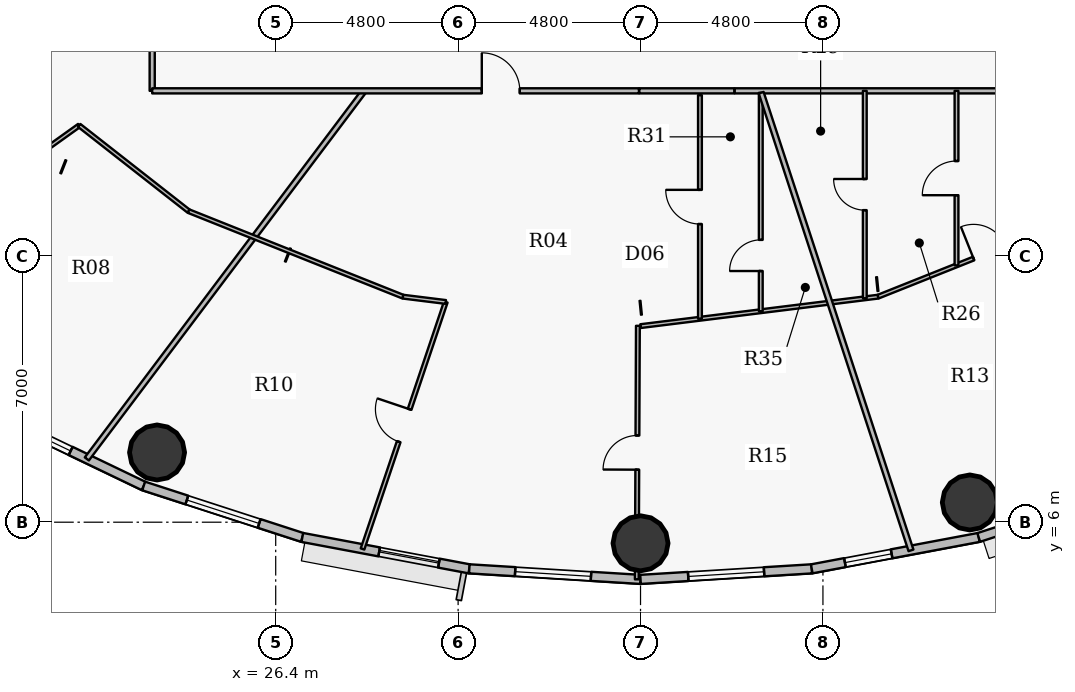
"""IFC4 building model, lengths in metres.
Left out: names, types, materials, properties, quantities, classifications, styles, units other than length and angle.
Written with IfcOpenShell. Run it as: python <this file> out.ifc"""

import sys

from ifc_helpers import new_model, si_unit, direction, frame, frame_2d, origin, origin_2d, place, context, subcontext, project, spatial, rectangle, hollow_circle, extrude, source, transform, mapped, element, fill, save


model = new_model("IFC4")
c1 = context("Model", 3, precision=1e-05, world=origin(), true_north=direction((0.0, 1.0)))
c2 = subcontext(c1, "Body", "Model", "MODEL_VIEW")
j1 = project(units=[si_unit("LENGTHUNIT", "METRE"), si_unit("PLANEANGLEUNIT", "RADIAN")], contexts=[c1])
p1 = place(None, origin())
s1 = spatial("IfcSite", under=j1, at=p1, CompositionType="ELEMENT")
p2 = place(p1, origin())
s2 = spatial("IfcBuilding", under=s1, at=p2, CompositionType="ELEMENT")
p3 = place(p2, frame((0.0, 0.0, 112.2)))
s3 = spatial("IfcBuildingStorey", under=s2, at=p3, CompositionType="ELEMENT", Elevation=112.2)
for number, where, z_axis, x_axis in (
    (1, (23.278, 7.835, 0.0), (0.0, 0.0, 1.0), (1.0, 0.0, 0.0)),
    (2, (36.0, 5.445, 0.0), (0.0, 0.0, 1.0), (1.0, 0.0, 0.0)),
    (3, (44.666, 6.519, 0.0), (0.0, 0.0, 1.0), (1.0, 0.0, 0.0)),
):
    element("IfcColumn", number, at=place(p3, frame(where, z_axis=z_axis, x_axis=x_axis)), inside=s3, PredefinedType="COLUMN", context=c2, shape_type="SweptSolid", body=[
        extrude(hollow_circle(Radius=0.725, WallThickness=0.042, at=origin_2d()), origin(), (0.0, 0.0, 1.0), 3.75),
    ])
p4 = place(p3, frame((22.926, 6.953, 0.0), z_axis=(0.0, 0.0, 1.0), x_axis=(-0.901589935876, 0.432591709962, 0.0)))
e4 = element("IfcWall", 4, at=p4, inside=s3, PredefinedType="SOLIDWALL", context=c2, shape_type="SweptSolid", body=[
    extrude(rectangle(XDim=4.272, YDim=0.24, at=frame_2d((2.136, 0.0))), origin(), (0.0, 0.0, 1.0), 3.5),
])
p5 = place(p4, frame((2.132, 0.0, 0.9)))
e5 = element("IfcOpeningElement", 5, at=p5, cuts=e4, PredefinedType="OPENING", context=c2, shape_type="SweptSolid", body=[
    extrude(rectangle(XDim=1.25, YDim=1.65, at=origin_2d()), frame((0.625, 0.13, 0.825), z_axis=(0.0, -1.0, 0.0), x_axis=(1.0, 0.0, 0.0)), (0.0, 0.0, 1.0), 0.26),
])
p6 = place(p3, frame((27.1, 5.599, 0.0), z_axis=(0.0, 0.0, 1.0), x_axis=(-0.951211346073, 0.308540070495, 0.0)))
e6 = element("IfcWall", 6, at=p6, inside=s3, PredefinedType="SOLIDWALL", context=c2, shape_type="SweptSolid", body=[
    extrude(rectangle(XDim=4.388, YDim=0.24, at=frame_2d((2.194, 0.0))), origin(), (0.0, 0.0, 1.0), 3.5),
])
p7 = place(p6, frame((1.194, 0.0, 0.9)))
e7 = element("IfcOpeningElement", 7, at=p7, cuts=e6, PredefinedType="OPENING", context=c2, shape_type="SweptSolid", body=[
    extrude(rectangle(XDim=2.0, YDim=1.75, at=origin_2d()), frame((1.0, 0.13, 0.875), z_axis=(0.0, -1.0, 0.0), x_axis=(1.0, 0.0, 0.0)), (0.0, 0.0, 1.0), 0.26),
])
p8 = place(p3, frame((31.494, 4.773, 0.0), z_axis=(0.0, 0.0, 1.0), x_axis=(-0.982789252177, 0.184730305596, 0.0)))
e8 = element("IfcWall", 8, at=p8, inside=s3, PredefinedType="SOLIDWALL", context=c2, shape_type="SweptSolid", body=[
    extrude(rectangle(XDim=4.471, YDim=0.24, at=frame_2d((2.235, 0.0))), origin(), (0.0, 0.0, 1.0), 3.5),
])
p9 = place(p8, frame((0.814, 0.0, 0.9)))
e9 = element("IfcOpeningElement", 9, at=p9, cuts=e8, PredefinedType="OPENING", context=c2, shape_type="SweptSolid", body=[
    extrude(rectangle(XDim=1.6, YDim=1.75, at=origin_2d()), frame((0.8, 0.13, 0.875), z_axis=(0.0, -1.0, 0.0), x_axis=(1.0, 0.0, 0.0)), (0.0, 0.0, 1.0), 0.26),
])
p10 = place(p3, frame((36.0, 4.495, 0.0), z_axis=(0.0, 0.0, 1.0), x_axis=(-0.998107531589, 0.061492726276, 0.0)))
e10 = element("IfcWall", 10, at=p10, inside=s3, PredefinedType="SOLIDWALL", context=c2, shape_type="SweptSolid", body=[
    extrude(rectangle(XDim=4.514, YDim=0.24, at=frame_2d((2.257, 0.0))), origin(), (0.0, 0.0, 1.0), 3.5),
])
p11 = place(p10, frame((1.306, 0.0, 0.9)))
e11 = element("IfcOpeningElement", 11, at=p11, cuts=e10, PredefinedType="OPENING", context=c2, shape_type="SweptSolid", body=[
    extrude(rectangle(XDim=2.0, YDim=1.75, at=origin_2d()), frame((1.0, 0.13, 0.875), z_axis=(0.0, -1.0, 0.0), x_axis=(1.0, 0.0, 0.0)), (0.0, 0.0, 1.0), 0.26),
])
p12 = place(p3, frame((40.506, 4.773, 0.0), z_axis=(0.0, 0.0, 1.0), x_axis=(-0.998107531589, -0.061492726276, 0.0)))
e12 = element("IfcWall", 12, at=p12, inside=s3, PredefinedType="SOLIDWALL", context=c2, shape_type="SweptSolid", body=[
    extrude(rectangle(XDim=4.514, YDim=0.24, at=frame_2d((2.257, 0.0))), origin(), (0.0, 0.0, 1.0), 3.5),
])
p13 = place(p12, frame((1.257, 0.0, 0.9)))
e13 = element("IfcOpeningElement", 13, at=p13, cuts=e12, PredefinedType="OPENING", context=c2, shape_type="SweptSolid", body=[
    extrude(rectangle(XDim=2.0, YDim=1.75, at=origin_2d()), frame((1.0, 0.13, 0.875), z_axis=(0.0, -1.0, 0.0), x_axis=(1.0, 0.0, 0.0)), (0.0, 0.0, 1.0), 0.26),
])
p14 = place(p3, frame((44.9, 5.599, 0.0), z_axis=(0.0, 0.0, 1.0), x_axis=(-0.982789252177, -0.184730305596, 0.0)))
e14 = element("IfcWall", 14, at=p14, inside=s3, PredefinedType="SOLIDWALL", context=c2, shape_type="SweptSolid", body=[
    extrude(rectangle(XDim=4.471, YDim=0.24, at=frame_2d((2.235, 0.0))), origin(), (0.0, 0.0, 1.0), 3.5),
])
p15 = place(p14, frame((2.333, 0.0, 0.9)))
e15 = element("IfcOpeningElement", 15, at=p15, cuts=e14, PredefinedType="OPENING", context=c2, shape_type="SweptSolid", body=[
    extrude(rectangle(XDim=1.25, YDim=1.65, at=origin_2d()), frame((0.625, 0.13, 0.825), z_axis=(0.0, -1.0, 0.0), x_axis=(1.0, 0.0, 0.0)), (0.0, 0.0, 1.0), 0.26),
])
p16 = place(p3, frame((49.074, 6.953, 0.0), z_axis=(0.0, 0.0, 1.0), x_axis=(-0.951211346073, -0.308540070495, 0.0)))
e16 = element("IfcWall", 16, at=p16, inside=s3, PredefinedType="SOLIDWALL", context=c2, shape_type="SweptSolid", body=[
    extrude(rectangle(XDim=4.388, YDim=0.24, at=frame_2d((2.194, 0.0))), origin(), (0.0, 0.0, 1.0), 3.5),
])
p17 = place(p16, frame((1.194, 0.0, 0.9)))
e17 = element("IfcOpeningElement", 17, at=p17, cuts=e16, PredefinedType="OPENING", context=c2, shape_type="SweptSolid", body=[
    extrude(rectangle(XDim=2.0, YDim=1.75, at=origin_2d()), frame((1.0, 0.13, 0.875), z_axis=(0.0, -1.0, 0.0), x_axis=(1.0, 0.0, 0.0)), (0.0, 0.0, 1.0), 0.26),
])
p18 = place(p3, frame((14.811, 11.851, 0.0), z_axis=(0.0, 0.0, 1.0), x_axis=(0.813476205606, 0.581598197137, 0.0)))
e18 = element("IfcWall", 18, at=p18, inside=s3, PredefinedType="PARTITIONING", context=c2, shape_type="SweptSolid", body=[
    extrude(rectangle(XDim=7.889, YDim=0.1, at=frame_2d((3.945, 0.0))), origin(), (0.0, 0.0, 1.0), 2.935),
])
p19 = place(p18, frame((3.495, 0.0, 0.0)))
e19 = element("IfcOpeningElement", 19, at=p19, cuts=e18, PredefinedType="OPENING", context=c2, shape_type="SweptSolid", body=[
    extrude(rectangle(XDim=0.9, YDim=2.1, at=origin_2d()), frame((0.45, 0.06, 1.05), z_axis=(0.0, -1.0, 0.0), x_axis=(1.0, 0.0, 0.0)), (0.0, 0.0, 1.0), 0.12),
])
p20 = place(p3, frame((21.229, 16.44, 0.0), z_axis=(0.0, 0.0, 1.0), x_axis=(0.787324700524, -0.616538576201, 0.0)))
e20 = element("IfcWall", 20, at=p20, inside=s3, PredefinedType="PARTITIONING", context=c2, shape_type="SweptSolid", body=[
    extrude(rectangle(XDim=3.658, YDim=0.1, at=frame_2d((1.829, 0.0))), origin(), (0.0, 0.0, 1.0), 2.935),
])
p21 = place(p3, frame((21.43, 7.665, 0.0), z_axis=(0.0, 0.0, 1.0), x_axis=(0.601821582461, 0.798630567211, 0.0)))
e21 = element("IfcWall", 21, at=p21, inside=s3, PredefinedType="PARTITIONING", context=c2, shape_type="SweptSolid", body=[
    extrude(rectangle(XDim=12.127, YDim=0.135, at=frame_2d((6.063, 0.0))), origin(), (0.0, 0.0, 1.0), 2.935),
])
p22 = place(p3, frame((23.15, 17.35, 0.0), z_axis=(0.0, 0.0, 1.0), x_axis=(0.0, 1.0, 0.0)))
e22 = element("IfcWall", 22, at=p22, inside=s3, PredefinedType="PARTITIONING", context=c2, shape_type="SweptSolid", body=[
    extrude(rectangle(XDim=19.3, YDim=0.135, at=frame_2d((9.65, 0.0))), origin(), (0.0, 0.0, 1.0), 2.935),
])
p23 = place(p22, frame((15.889, 0.0, 0.0)))
e23 = element("IfcOpeningElement", 23, at=p23, cuts=e22, PredefinedType="OPENING", context=c2, shape_type="SweptSolid", body=[
    extrude(rectangle(XDim=1.0, YDim=2.15, at=origin_2d()), frame((0.5, 0.078, 1.075), z_axis=(0.0, -1.0, 0.0), x_axis=(1.0, 0.0, 0.0)), (0.0, 0.0, 1.0), 0.155),
])
p24 = place(p22, frame((6.279, 0.0, 0.0)))
e24 = element("IfcOpeningElement", 24, at=p24, cuts=e22, PredefinedType="OPENING", context=c2, shape_type="SweptSolid", body=[
    extrude(rectangle(XDim=1.0, YDim=2.15, at=origin_2d()), frame((0.5, 0.078, 1.075), z_axis=(0.0, -1.0, 0.0), x_axis=(1.0, 0.0, 0.0)), (0.0, 0.0, 1.0), 0.155),
])
p25 = place(p3, frame((23.15, 17.35, 0.0), z_axis=(0.0, 0.0, 1.0), x_axis=(1.0, 0.0, 0.0)))
e25 = element("IfcWall", 25, at=p25, inside=s3, PredefinedType="PARTITIONING", context=c2, shape_type="SweptSolid", body=[
    extrude(rectangle(XDim=12.808, YDim=0.135, at=frame_2d((6.404, 0.0))), origin(), (0.0, 0.0, 1.0), 2.935),
])
p26 = place(p25, frame((8.673, 0.0, 0.0)))
e26 = element("IfcOpeningElement", 26, at=p26, cuts=e25, PredefinedType="OPENING", context=c2, shape_type="SweptSolid", body=[
    extrude(rectangle(XDim=1.0, YDim=2.15, at=origin_2d()), frame((0.5, 0.078, 1.075), z_axis=(0.0, -1.0, 0.0), x_axis=(1.0, 0.0, 0.0)), (0.0, 0.0, 1.0), 0.155),
])
p27 = place(p3, frame((24.109, 14.184, 0.0), z_axis=(0.0, 0.0, 1.0), x_axis=(0.928803554156, -0.370572473055, 0.0)))
e27 = element("IfcWall", 27, at=p27, inside=s3, PredefinedType="PARTITIONING", context=c2, shape_type="SweptSolid", body=[
    extrude(rectangle(XDim=6.072, YDim=0.1, at=frame_2d((3.036, 0.0))), origin(), (0.0, 0.0, 1.0), 2.935),
])
p28 = place(p3, frame((28.685, 5.296, 0.0), z_axis=(0.0, 0.0, 1.0), x_axis=(0.319387131438, 0.947624324441, 0.0)))
e28 = element("IfcWall", 28, at=p28, inside=s3, PredefinedType="PARTITIONING", context=c2, shape_type="SweptSolid", body=[
    extrude(rectangle(XDim=6.858, YDim=0.1, at=frame_2d((3.429, 0.0))), origin(), (0.0, 0.0, 1.0), 2.935),
])
p29 = place(p28, frame((2.979, 0.0, 0.0)))
e29 = element("IfcOpeningElement", 29, at=p29, cuts=e28, PredefinedType="OPENING", context=c2, shape_type="SweptSolid", body=[
    extrude(rectangle(XDim=0.9, YDim=2.1, at=origin_2d()), frame((0.45, 0.06, 1.05), z_axis=(0.0, -1.0, 0.0), x_axis=(1.0, 0.0, 0.0)), (0.0, 0.0, 1.0), 0.12),
])
p30 = place(p3, frame((29.749, 11.934, 0.0), z_axis=(0.0, 0.0, 1.0), x_axis=(0.99240961586, -0.122976234894, 0.0)))
e30 = element("IfcWall", 30, at=p30, inside=s3, PredefinedType="PARTITIONING", context=c2, shape_type="SweptSolid", body=[
    extrude(rectangle(XDim=1.135, YDim=0.1, at=frame_2d((0.568, 0.0))), origin(), (0.0, 0.0, 1.0), 3.5),
])
p31 = place(p3, frame((35.902, 4.496, 0.0), z_axis=(0.0, 0.0, 1.0), x_axis=(0.004354785612, 0.999990517876, 0.0)))
e31 = element("IfcWall", 31, at=p31, inside=s3, PredefinedType="PARTITIONING", context=c2, shape_type="SweptSolid", body=[
    extrude(rectangle(XDim=6.671, YDim=0.1, at=frame_2d((3.336, 0.0))), origin(), (0.0, 0.0, 1.0), 2.935),
])
p32 = place(p31, frame((2.886, 0.0, 0.0)))
e32 = element("IfcOpeningElement", 32, at=p32, cuts=e31, PredefinedType="OPENING", context=c2, shape_type="SweptSolid", body=[
    extrude(rectangle(XDim=0.9, YDim=2.1, at=origin_2d()), frame((0.45, 0.06, 1.05), z_axis=(0.0, -1.0, 0.0), x_axis=(1.0, 0.0, 0.0)), (0.0, 0.0, 1.0), 0.12),
])
p33 = place(p3, frame((36.0, 11.159, 0.0), z_axis=(0.0, 0.0, 1.0), x_axis=(0.992395485088, 0.123090215599, 0.0)))
e33 = element("IfcWall", 33, at=p33, inside=s3, PredefinedType="PARTITIONING", context=c2, shape_type="SweptSolid", body=[
    extrude(rectangle(XDim=6.299, YDim=0.1, at=frame_2d((3.15, 0.0))), origin(), (0.0, 0.0, 1.0), 2.935),
])
p34 = place(p3, frame((37.564, 11.353, 0.0), z_axis=(0.0, 0.0, 1.0), x_axis=(0.0, 1.0, 0.0)))
e34 = element("IfcWall", 34, at=p34, inside=s3, PredefinedType="PARTITIONING", context=c2, shape_type="SweptSolid", body=[
    extrude(rectangle(XDim=5.884, YDim=0.1, at=frame_2d((2.942, 0.0))), origin(), (0.0, 0.0, 1.0), 2.985),
])
p35 = place(p34, frame((2.492, 0.0, 0.0)))
e35 = element("IfcOpeningElement", 35, at=p35, cuts=e34, PredefinedType="OPENING", context=c2, shape_type="SweptSolid", body=[
    extrude(rectangle(XDim=0.9, YDim=2.1, at=origin_2d()), frame((0.45, 0.06, 1.05), z_axis=(0.0, -1.0, 0.0), x_axis=(1.0, 0.0, 0.0)), (0.0, 0.0, 1.0), 0.12),
])
p36 = place(p3, frame((38.477, 17.35, 0.0), z_axis=(0.0, 0.0, 1.0), x_axis=(1.0, 0.0, 0.0)))
e36 = element("IfcWall", 36, at=p36, inside=s3, PredefinedType="PARTITIONING", context=c2, shape_type="SweptSolid", body=[
    extrude(rectangle(XDim=10.373, YDim=0.135, at=frame_2d((5.187, 0.0))), origin(), (0.0, 0.0, 1.0), 2.935),
])
p37 = place(p3, frame((39.164, 11.552, 0.0), z_axis=(0.0, 0.0, 1.0), x_axis=(0.0, 1.0, 0.0)))
e37 = element("IfcWall", 37, at=p37, inside=s3, PredefinedType="PARTITIONING", context=c2, shape_type="SweptSolid", body=[
    extrude(rectangle(XDim=5.748, YDim=0.1, at=frame_2d((2.874, 0.0))), origin(), (0.0, 0.0, 1.0), 2.985),
])
p38 = place(p37, frame((1.058, 0.0, 0.0)))
e38 = element("IfcOpeningElement", 38, at=p38, cuts=e37, PredefinedType="OPENING", context=c2, shape_type="SweptSolid", body=[
    extrude(rectangle(XDim=0.82, YDim=2.1, at=origin_2d()), frame((0.41, 0.06, 1.05), z_axis=(0.0, -1.0, 0.0), x_axis=(1.0, 0.0, 0.0)), (0.0, 0.0, 1.0), 0.12),
])
p39 = place(p3, frame((39.175, 17.301, 0.0), z_axis=(0.0, 0.0, 1.0), x_axis=(0.311090320612, -0.95038035145, 0.0)))
e39 = element("IfcWall", 39, at=p39, inside=s3, PredefinedType="PARTITIONING", context=c2, shape_type="SweptSolid", body=[
    extrude(rectangle(XDim=12.671, YDim=0.135, at=frame_2d((6.335, 0.0))), origin(), (0.0, 0.0, 1.0), 2.935),
])
p40 = place(p3, frame((41.901, 11.891, 0.0), z_axis=(0.0, 0.0, 1.0), x_axis=(0.0, 1.0, 0.0)))
e40 = element("IfcWall", 40, at=p40, inside=s3, PredefinedType="PARTITIONING", context=c2, shape_type="SweptSolid", body=[
    extrude(rectangle(XDim=5.459, YDim=0.1, at=frame_2d((2.729, 0.0))), origin(), (0.0, 0.0, 1.0), 2.935),
])
p41 = place(p40, frame((2.32, 0.0, 0.0)))
e41 = element("IfcOpeningElement", 41, at=p41, cuts=e40, PredefinedType="OPENING", context=c2, shape_type="SweptSolid", body=[
    extrude(rectangle(XDim=0.82, YDim=2.1, at=origin_2d()), frame((0.41, 0.06, 1.05), z_axis=(0.0, -1.0, 0.0), x_axis=(1.0, 0.0, 0.0)), (0.0, 0.0, 1.0), 0.12),
])
p42 = place(p3, frame((42.251, 11.934, 0.0), z_axis=(0.0, 0.0, 1.0), x_axis=(0.928803554156, 0.370572473055, 0.0)))
e42 = element("IfcWall", 42, at=p42, inside=s3, PredefinedType="PARTITIONING", context=c2, shape_type="SweptSolid", body=[
    extrude(rectangle(XDim=6.072, YDim=0.1, at=frame_2d((3.036, 0.0))), origin(), (0.0, 0.0, 1.0), 2.935),
])
p43 = place(p42, frame((2.705, 0.0, 0.0)))
e43 = element("IfcOpeningElement", 43, at=p43, cuts=e42, PredefinedType="OPENING", context=c2, shape_type="SweptSolid", body=[
    extrude(rectangle(XDim=0.9, YDim=2.1, at=origin_2d()), frame((0.45, 0.06, 1.05), z_axis=(0.0, -1.0, 0.0), x_axis=(1.0, 0.0, 0.0)), (0.0, 0.0, 1.0), 0.12),
])
p44 = place(p3, frame((44.315, 12.758, 0.0), z_axis=(0.0, 0.0, 1.0), x_axis=(0.0, 1.0, 0.0)))
e44 = element("IfcWall", 44, at=p44, inside=s3, PredefinedType="PARTITIONING", context=c2, shape_type="SweptSolid", body=[
    extrude(rectangle(XDim=4.593, YDim=0.1, at=frame_2d((2.296, 0.0))), origin(), (0.0, 0.0, 1.0), 3.5),
])
p45 = place(p44, frame((1.846, 0.0, 0.0)))
e45 = element("IfcOpeningElement", 45, at=p45, cuts=e44, PredefinedType="OPENING", context=c2, shape_type="SweptSolid", body=[
    extrude(rectangle(XDim=0.9, YDim=2.1, at=origin_2d()), frame((0.45, 0.06, 1.05), z_axis=(0.0, -1.0, 0.0), x_axis=(1.0, 0.0, 0.0)), (0.0, 0.0, 1.0), 0.12),
])
p46 = place(p3, frame((38.467, 17.35, 0.0), z_axis=(0.0, 0.0, 1.0), x_axis=(-1.0, 0.0, 0.0)))
e46 = element("IfcWall", 46, at=p46, inside=s3, PredefinedType="PARTITIONING", context=c2, shape_type="SweptSolid", body=[
    extrude(rectangle(XDim=2.499, YDim=0.135, at=frame_2d((1.25, 0.0))), origin(), (0.0, 0.0, 1.0), 2.935),
])
m1 = source(origin(), c2, "Body", "SweptSolid", [
    extrude(rectangle(XDim=1.25, YDim=1.65, at=origin_2d()), frame((0.625, 0.03, 0.825), z_axis=(0.0, -1.0, 0.0), x_axis=(1.0, 0.0, 0.0)), (0.0, 0.0, 1.0), 0.06),
])
p47 = place(p5, origin())
e47 = element("IfcWindow", 47, at=p47, inside=s3, PartitioningType="SINGLE_PANEL", PredefinedType="WINDOW", context=c2, shape_type="MappedRepresentation", body=[
    mapped(m1, transform((0.0, 0.0, 0.0), x_axis=(1.0, 0.0, 0.0), y_axis=(0.0, 1.0, 0.0), z_axis=(0.0, 0.0, 1.0), scale=1.0)),
])
fill(e5, e47)
m2 = source(origin(), c2, "Body", "SweptSolid", [
    extrude(rectangle(XDim=2.0, YDim=1.75, at=origin_2d()), frame((1.0, 0.03, 0.875), z_axis=(0.0, -1.0, 0.0), x_axis=(1.0, 0.0, 0.0)), (0.0, 0.0, 1.0), 0.06),
])
p48 = place(p7, origin())
e48 = element("IfcWindow", 48, at=p48, inside=s3, PartitioningType="DOUBLE_PANEL_VERTICAL", PredefinedType="WINDOW", context=c2, shape_type="MappedRepresentation", body=[
    mapped(m2, transform((0.0, 0.0, 0.0), x_axis=(1.0, 0.0, 0.0), y_axis=(0.0, 1.0, 0.0), z_axis=(0.0, 0.0, 1.0), scale=1.0)),
])
fill(e7, e48)
m3 = source(origin(), c2, "Body", "SweptSolid", [
    extrude(rectangle(XDim=1.6, YDim=1.75, at=origin_2d()), frame((0.8, 0.03, 0.875), z_axis=(0.0, -1.0, 0.0), x_axis=(1.0, 0.0, 0.0)), (0.0, 0.0, 1.0), 0.06),
])
p49 = place(p9, origin())
e49 = element("IfcWindow", 49, at=p49, inside=s3, PartitioningType="DOUBLE_PANEL_VERTICAL", PredefinedType="WINDOW", context=c2, shape_type="MappedRepresentation", body=[
    mapped(m3, transform((0.0, 0.0, 0.0), x_axis=(1.0, 0.0, 0.0), y_axis=(0.0, 1.0, 0.0), z_axis=(0.0, 0.0, 1.0), scale=1.0)),
])
fill(e9, e49)
p50 = place(p11, origin())
e50 = element("IfcWindow", 50, at=p50, inside=s3, PartitioningType="DOUBLE_PANEL_VERTICAL", PredefinedType="WINDOW", context=c2, shape_type="MappedRepresentation", body=[
    mapped(m2, transform((0.0, 0.0, 0.0), x_axis=(1.0, 0.0, 0.0), y_axis=(0.0, 1.0, 0.0), z_axis=(0.0, 0.0, 1.0), scale=1.0)),
])
fill(e11, e50)
p51 = place(p13, origin())
e51 = element("IfcWindow", 51, at=p51, inside=s3, PartitioningType="DOUBLE_PANEL_VERTICAL", PredefinedType="WINDOW", context=c2, shape_type="MappedRepresentation", body=[
    mapped(m2, transform((0.0, 0.0, 0.0), x_axis=(1.0, 0.0, 0.0), y_axis=(0.0, 1.0, 0.0), z_axis=(0.0, 0.0, 1.0), scale=1.0)),
])
fill(e13, e51)
p52 = place(p15, origin())
e52 = element("IfcWindow", 52, at=p52, inside=s3, PartitioningType="SINGLE_PANEL", PredefinedType="WINDOW", context=c2, shape_type="MappedRepresentation", body=[
    mapped(m1, transform((0.0, 0.0, 0.0), x_axis=(1.0, 0.0, 0.0), y_axis=(0.0, 1.0, 0.0), z_axis=(0.0, 0.0, 1.0), scale=1.0)),
])
fill(e15, e52)
m4 = source(origin(), c2, "Body", "SweptSolid", [
    extrude(rectangle(XDim=1.0, YDim=2.15, at=origin_2d()), frame((0.5, 0.025, 1.075), z_axis=(0.0, -1.0, 0.0), x_axis=(1.0, 0.0, 0.0)), (0.0, 0.0, 1.0), 0.05),
])
p53 = place(p26, origin())
e53 = element("IfcDoor", 53, at=p53, inside=s3, OperationType="SINGLE_SWING_LEFT", PredefinedType="DOOR", context=c2, shape_type="MappedRepresentation", body=[
    mapped(m4, transform((0.0, 0.0, 0.0), x_axis=(1.0, 0.0, 0.0), y_axis=(0.0, 1.0, 0.0), z_axis=(0.0, 0.0, 1.0), scale=1.0)),
])
fill(e26, e53)
m5 = source(origin(), c2, "Body", "SweptSolid", [
    extrude(rectangle(XDim=0.9, YDim=2.1, at=origin_2d()), frame((0.45, 0.025, 1.05), z_axis=(0.0, -1.0, 0.0), x_axis=(1.0, 0.0, 0.0)), (0.0, 0.0, 1.0), 0.05),
])
p54 = place(p29, origin())
e54 = element("IfcDoor", 54, at=p54, inside=s3, OperationType="SINGLE_SWING_RIGHT", PredefinedType="DOOR", context=c2, shape_type="MappedRepresentation", body=[
    mapped(m5, transform((0.0, 0.0, 0.0), x_axis=(1.0, 0.0, 0.0), y_axis=(0.0, 1.0, 0.0), z_axis=(0.0, 0.0, 1.0), scale=1.0)),
])
fill(e29, e54)
p55 = place(p32, origin())
e55 = element("IfcDoor", 55, at=p55, inside=s3, OperationType="SINGLE_SWING_LEFT", PredefinedType="DOOR", context=c2, shape_type="MappedRepresentation", body=[
    mapped(m5, transform((0.0, 0.0, 0.0), x_axis=(1.0, 0.0, 0.0), y_axis=(0.0, 1.0, 0.0), z_axis=(0.0, 0.0, 1.0), scale=1.0)),
])
fill(e32, e55)
p56 = place(p35, origin())
e56 = element("IfcDoor", 56, at=p56, inside=s3, OperationType="SINGLE_SWING_RIGHT", PredefinedType="DOOR", context=c2, shape_type="MappedRepresentation", body=[
    mapped(m5, transform((0.0, 0.0, 0.0), x_axis=(1.0, 0.0, 0.0), y_axis=(0.0, 1.0, 0.0), z_axis=(0.0, 0.0, 1.0), scale=1.0)),
])
fill(e35, e56)
m6 = source(origin(), c2, "Body", "SweptSolid", [
    extrude(rectangle(XDim=0.82, YDim=2.1, at=origin_2d()), frame((0.41, 0.025, 1.05), z_axis=(0.0, -1.0, 0.0), x_axis=(1.0, 0.0, 0.0)), (0.0, 0.0, 1.0), 0.05),
])
p57 = place(p38, origin())
e57 = element("IfcDoor", 57, at=p57, inside=s3, OperationType="SINGLE_SWING_LEFT", PredefinedType="DOOR", context=c2, shape_type="MappedRepresentation", body=[
    mapped(m6, transform((0.0, 0.0, 0.0), x_axis=(1.0, 0.0, 0.0), y_axis=(0.0, 1.0, 0.0), z_axis=(0.0, 0.0, 1.0), scale=1.0)),
])
fill(e38, e57)
p58 = place(p43, origin())
e58 = element("IfcDoor", 58, at=p58, inside=s3, OperationType="SINGLE_SWING_LEFT", PredefinedType="DOOR", context=c2, shape_type="MappedRepresentation", body=[
    mapped(m5, transform((0.0, 0.0, 0.0), x_axis=(1.0, 0.0, 0.0), y_axis=(0.0, 1.0, 0.0), z_axis=(0.0, 0.0, 1.0), scale=1.0)),
])
fill(e43, e58)
p59 = place(p45, origin())
e59 = element("IfcDoor", 59, at=p59, inside=s3, OperationType="SINGLE_SWING_LEFT", PredefinedType="DOOR", context=c2, shape_type="MappedRepresentation", body=[
    mapped(m5, transform((0.0, 0.0, 0.0), x_axis=(1.0, 0.0, 0.0), y_axis=(0.0, 1.0, 0.0), z_axis=(0.0, 0.0, 1.0), scale=1.0)),
])
fill(e45, e59)
p60 = place(p41, origin())
e60 = element("IfcDoor", 60, at=p60, inside=s3, OperationType="SINGLE_SWING_RIGHT", PredefinedType="DOOR", context=c2, shape_type="MappedRepresentation", body=[
    mapped(m6, transform((0.0, 0.0, 0.0), x_axis=(1.0, 0.0, 0.0), y_axis=(0.0, 1.0, 0.0), z_axis=(0.0, 0.0, 1.0), scale=1.0)),
])
fill(e41, e60)
save(model, sys.argv[1])
